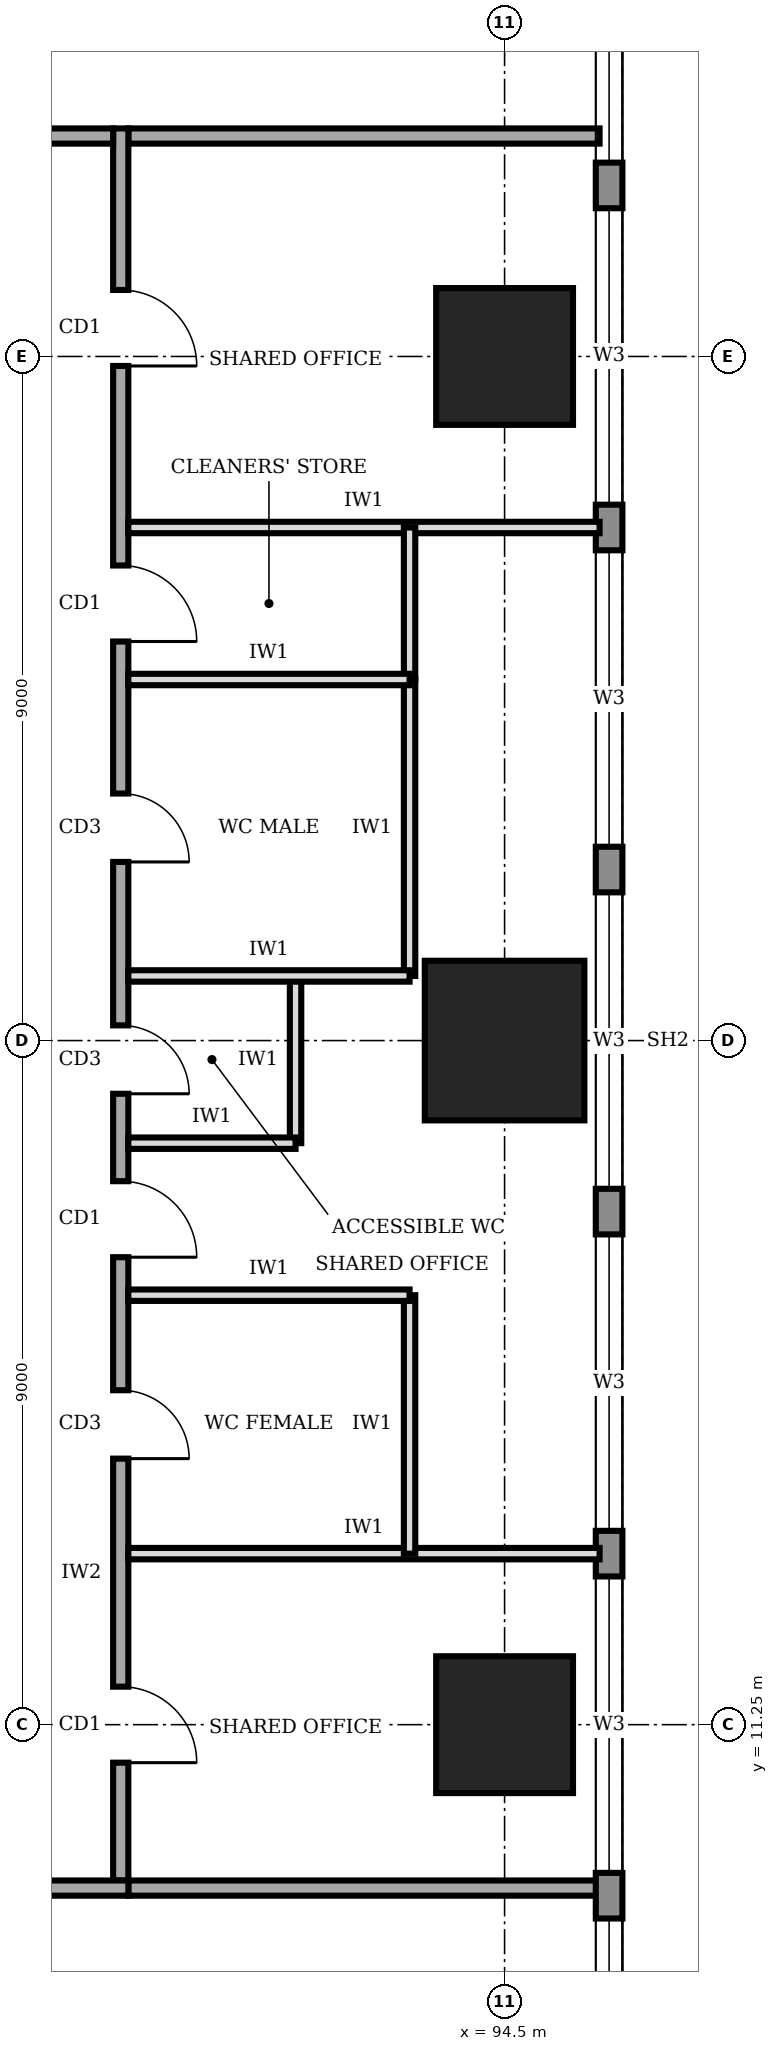
"""IFC4 building model, lengths in metres.
Left out: names, types, materials, properties, quantities, classifications, styles, units other than length and angle.
Written with IfcOpenShell. Run it as: python <this file> out.ifc"""

import sys

from ifc_helpers import new_model, si_unit, direction, frame, frame_2d, origin, origin_2d, place, context, subcontext, project, spatial, rectangle, extrude, element, fill, save


model = new_model("IFC4")
c1 = context("Model", 3, precision=1e-05, world=origin(), true_north=direction((0.0, 1.0)))
c2 = subcontext(c1, "Body", "Model", "MODEL_VIEW")
j1 = project(units=[si_unit("LENGTHUNIT", "METRE"), si_unit("PLANEANGLEUNIT", "RADIAN")], contexts=[c1])
p1 = place(None, origin())
s1 = spatial("IfcSite", under=j1, at=p1, CompositionType="ELEMENT")
p2 = place(p1, origin())
s2 = spatial("IfcBuilding", under=s1, at=p2, CompositionType="ELEMENT")
p3 = place(p2, frame((0.0, 0.0, 177.0)))
s3 = spatial("IfcBuildingStorey", under=s2, at=p3, CompositionType="ELEMENT", Elevation=177.0)
p4 = place(p3, frame((94.5, 11.25, 0.0), z_axis=(0.0, 0.0, 1.0), x_axis=(1.0, 0.0, 0.0)))
e1 = element("IfcColumn", 1, at=p4, inside=s3, PredefinedType="COLUMN", context=c2, shape_type="SweptSolid", body=[
    extrude(rectangle(XDim=1.8, YDim=1.8, at=origin_2d()), origin(), (0.0, 0.0, 1.0), 4.0),
])
p5 = place(p3, frame((94.5, 20.25, 0.0), z_axis=(0.0, 0.0, 1.0), x_axis=(1.0, 0.0, 0.0)))
e2 = element("IfcColumn", 2, at=p5, inside=s3, PredefinedType="COLUMN", context=c2, shape_type="SweptSolid", body=[
    extrude(rectangle(XDim=2.1, YDim=2.1, at=origin_2d()), origin(), (0.0, 0.0, 1.0), 4.0),
])
p6 = place(p3, frame((94.5, 29.25, 0.0), z_axis=(0.0, 0.0, 1.0), x_axis=(1.0, 0.0, 0.0)))
e3 = element("IfcColumn", 3, at=p6, inside=s3, PredefinedType="COLUMN", context=c2, shape_type="SweptSolid", body=[
    extrude(rectangle(XDim=1.8, YDim=1.8, at=origin_2d()), origin(), (0.0, 0.0, 1.0), 4.0),
])
p7 = place(p3, frame((95.875, 3.32, 0.0), z_axis=(0.0, 0.0, 1.0), x_axis=(0.0, 1.0, 0.0)))
e4 = element("IfcWall", 4, at=p7, inside=s3, PredefinedType="STANDARD", context=c2, shape_type="SweptSolid", body=[
    extrude(rectangle(XDim=33.86, YDim=0.35, at=frame_2d((16.93, 0.0))), origin(), (0.0, 0.0, 1.0), 3.75),
])
p8 = place(p7, frame((1.48, 0.0, 0.95)))
e5 = element("IfcOpeningElement", 5, at=p8, cuts=e4, PredefinedType="OPENING", context=c2, shape_type="SweptSolid", body=[
    extrude(rectangle(XDim=3.9, YDim=1.8, at=frame_2d((1.95, 0.9))), frame((0.0, 0.185, 0.0), z_axis=(0.0, -1.0, 0.0), x_axis=(1.0, 0.0, 0.0)), (0.0, 0.0, 1.0), 0.37),
])
p9 = place(p7, frame((5.98, 0.0, 0.95)))
e6 = element("IfcOpeningElement", 6, at=p9, cuts=e4, PredefinedType="OPENING", context=c2, shape_type="SweptSolid", body=[
    extrude(rectangle(XDim=3.9, YDim=1.8, at=frame_2d((1.95, 0.9))), frame((0.0, 0.185, 0.0), z_axis=(0.0, -1.0, 0.0), x_axis=(1.0, 0.0, 0.0)), (0.0, 0.0, 1.0), 0.37),
])
p10 = place(p7, frame((10.48, 0.0, 0.95)))
e7 = element("IfcOpeningElement", 7, at=p10, cuts=e4, PredefinedType="OPENING", context=c2, shape_type="SweptSolid", body=[
    extrude(rectangle(XDim=3.9, YDim=1.8, at=frame_2d((1.95, 0.9))), frame((0.0, 0.185, 0.0), z_axis=(0.0, -1.0, 0.0), x_axis=(1.0, 0.0, 0.0)), (0.0, 0.0, 1.0), 0.37),
])
p11 = place(p7, frame((14.98, 0.0, 0.95)))
e8 = element("IfcOpeningElement", 8, at=p11, cuts=e4, PredefinedType="OPENING", context=c2, shape_type="SweptSolid", body=[
    extrude(rectangle(XDim=3.9, YDim=1.8, at=frame_2d((1.95, 0.9))), frame((0.0, 0.185, 0.0), z_axis=(0.0, -1.0, 0.0), x_axis=(1.0, 0.0, 0.0)), (0.0, 0.0, 1.0), 0.37),
])
p12 = place(p7, frame((19.48, 0.0, 0.95)))
e9 = element("IfcOpeningElement", 9, at=p12, cuts=e4, PredefinedType="OPENING", context=c2, shape_type="SweptSolid", body=[
    extrude(rectangle(XDim=3.9, YDim=1.8, at=frame_2d((1.95, 0.9))), frame((0.0, 0.185, 0.0), z_axis=(0.0, -1.0, 0.0), x_axis=(1.0, 0.0, 0.0)), (0.0, 0.0, 1.0), 0.37),
])
p13 = place(p7, frame((23.98, 0.0, 0.95)))
e10 = element("IfcOpeningElement", 10, at=p13, cuts=e4, PredefinedType="OPENING", context=c2, shape_type="SweptSolid", body=[
    extrude(rectangle(XDim=3.9, YDim=1.8, at=frame_2d((1.95, 0.9))), frame((0.0, 0.185, 0.0), z_axis=(0.0, -1.0, 0.0), x_axis=(1.0, 0.0, 0.0)), (0.0, 0.0, 1.0), 0.37),
])
p14 = place(p7, frame((28.48, 0.0, 0.95)))
e11 = element("IfcOpeningElement", 11, at=p14, cuts=e4, PredefinedType="OPENING", context=c2, shape_type="SweptSolid", body=[
    extrude(rectangle(XDim=3.9, YDim=1.8, at=frame_2d((1.95, 0.9))), frame((0.0, 0.185, 0.0), z_axis=(0.0, -1.0, 0.0), x_axis=(1.0, 0.0, 0.0)), (0.0, 0.0, 1.0), 0.37),
])
p15 = place(p3, frame((72.65, 9.1, 0.0), z_axis=(0.0, 0.0, 1.0), x_axis=(1.0, 0.0, 0.0)))
e12 = element("IfcWall", 12, at=p15, inside=s3, PredefinedType="SOLIDWALL", context=c2, shape_type="SweptSolid", body=[
    extrude(rectangle(XDim=16.9, YDim=0.2, at=frame_2d((8.45, 0.0))), origin(), (0.0, 0.0, 1.0), 3.75),
])
p16 = place(p15, frame((1.325, 0.0, 0.0)))
e13 = element("IfcOpeningElement", 13, at=p16, cuts=e12, PredefinedType="OPENING", context=c2, shape_type="SweptSolid", body=[
    extrude(rectangle(XDim=1.0, YDim=2.1, at=frame_2d((0.5, 1.05))), frame((0.0, 0.11, 0.0), z_axis=(0.0, -1.0, 0.0), x_axis=(1.0, 0.0, 0.0)), (0.0, 0.0, 1.0), 0.22),
])
p17 = place(p15, frame((9.475, 0.0, 0.0)))
e14 = element("IfcOpeningElement", 14, at=p17, cuts=e12, PredefinedType="OPENING", context=c2, shape_type="SweptSolid", body=[
    extrude(rectangle(XDim=1.8, YDim=2.1, at=frame_2d((0.9, 1.05))), frame((0.0, 0.11, 0.0), z_axis=(0.0, -1.0, 0.0), x_axis=(1.0, 0.0, 0.0)), (0.0, 0.0, 1.0), 0.22),
])
p18 = place(p3, frame((89.45, 9.2, 0.0), z_axis=(0.0, 0.0, 1.0), x_axis=(0.0, 1.0, 0.0)))
e15 = element("IfcWall", 15, at=p18, inside=s3, PredefinedType="SOLIDWALL", context=c2, shape_type="SweptSolid", body=[
    extrude(rectangle(XDim=23.05, YDim=0.2, at=frame_2d((11.525, 0.0))), origin(), (0.0, 0.0, 1.0), 3.75),
])
p19 = place(p18, frame((1.55, 0.0, 0.0)))
e16 = element("IfcOpeningElement", 16, at=p19, cuts=e15, PredefinedType="OPENING", context=c2, shape_type="SweptSolid", body=[
    extrude(rectangle(XDim=1.0, YDim=2.1, at=frame_2d((0.5, 1.05))), frame((0.0, 0.11, 0.0), z_axis=(0.0, -1.0, 0.0), x_axis=(1.0, 0.0, 0.0)), (0.0, 0.0, 1.0), 0.22),
])
p20 = place(p18, frame((5.55, 0.0, 0.0)))
e17 = element("IfcOpeningElement", 17, at=p20, cuts=e15, PredefinedType="OPENING", context=c2, shape_type="SweptSolid", body=[
    extrude(rectangle(XDim=0.9, YDim=2.1, at=frame_2d((0.45, 1.05))), frame((0.0, 0.11, 0.0), z_axis=(0.0, -1.0, 0.0), x_axis=(1.0, 0.0, 0.0)), (0.0, 0.0, 1.0), 0.22),
])
p21 = place(p18, frame((10.35, 0.0, 0.0)))
e18 = element("IfcOpeningElement", 18, at=p21, cuts=e15, PredefinedType="OPENING", context=c2, shape_type="SweptSolid", body=[
    extrude(rectangle(XDim=0.9, YDim=2.1, at=frame_2d((0.45, 1.05))), frame((0.0, 0.11, 0.0), z_axis=(0.0, -1.0, 0.0), x_axis=(1.0, 0.0, 0.0)), (0.0, 0.0, 1.0), 0.22),
])
p22 = place(p18, frame((13.4, 0.0, 0.0)))
e19 = element("IfcOpeningElement", 19, at=p22, cuts=e15, PredefinedType="OPENING", context=c2, shape_type="SweptSolid", body=[
    extrude(rectangle(XDim=0.9, YDim=2.1, at=frame_2d((0.45, 1.05))), frame((0.0, 0.11, 0.0), z_axis=(0.0, -1.0, 0.0), x_axis=(1.0, 0.0, 0.0)), (0.0, 0.0, 1.0), 0.22),
])
p23 = place(p18, frame((16.3, 0.0, 0.0)))
e20 = element("IfcOpeningElement", 20, at=p23, cuts=e15, PredefinedType="OPENING", context=c2, shape_type="SweptSolid", body=[
    extrude(rectangle(XDim=1.0, YDim=2.1, at=frame_2d((0.5, 1.05))), frame((0.0, 0.11, 0.0), z_axis=(0.0, -1.0, 0.0), x_axis=(1.0, 0.0, 0.0)), (0.0, 0.0, 1.0), 0.22),
])
p24 = place(p18, frame((8.2, 0.0, 0.0)))
e21 = element("IfcOpeningElement", 21, at=p24, cuts=e15, PredefinedType="OPENING", context=c2, shape_type="SweptSolid", body=[
    extrude(rectangle(XDim=1.0, YDim=2.1, at=frame_2d((0.5, 1.05))), frame((0.0, 0.11, 0.0), z_axis=(0.0, -1.0, 0.0), x_axis=(1.0, 0.0, 0.0)), (0.0, 0.0, 1.0), 0.22),
])
p25 = place(p18, frame((19.925, 0.0, 0.0)))
e22 = element("IfcOpeningElement", 22, at=p25, cuts=e15, PredefinedType="OPENING", context=c2, shape_type="SweptSolid", body=[
    extrude(rectangle(XDim=1.0, YDim=2.1, at=frame_2d((0.5, 1.05))), frame((0.0, 0.11, 0.0), z_axis=(0.0, -1.0, 0.0), x_axis=(1.0, 0.0, 0.0)), (0.0, 0.0, 1.0), 0.22),
])
p26 = place(p3, frame((89.35, 32.15, 0.0), z_axis=(0.0, 0.0, 1.0), x_axis=(-1.0, 0.0, 0.0)))
e23 = element("IfcWall", 23, at=p26, inside=s3, PredefinedType="SOLIDWALL", context=c2, shape_type="SweptSolid", body=[
    extrude(rectangle(XDim=16.9, YDim=0.2, at=frame_2d((8.45, 0.0))), origin(), (0.0, 0.0, 1.0), 3.75),
])
p27 = place(p26, frame((3.575, 0.0, 0.0)))
e24 = element("IfcOpeningElement", 24, at=p27, cuts=e23, PredefinedType="OPENING", context=c2, shape_type="SweptSolid", body=[
    extrude(rectangle(XDim=1.0, YDim=2.1, at=frame_2d((0.5, 1.05))), frame((0.0, 0.11, 0.0), z_axis=(0.0, -1.0, 0.0), x_axis=(1.0, 0.0, 0.0)), (0.0, 0.0, 1.0), 0.22),
])
for number, where, z_axis, x_axis in (
    (25, (89.55, 9.1, 0.0), (0.0, 0.0, 1.0), (1.0, 0.0, 0.0)),
    (26, (89.55, 32.15, 0.0), (0.0, 0.0, 1.0), (1.0, 0.0, 0.0)),
):
    element("IfcWall", number, at=place(p3, frame(where, z_axis=z_axis, x_axis=x_axis)), inside=s3, PredefinedType="SOLIDWALL", context=c2, shape_type="SweptSolid", body=[
        extrude(rectangle(XDim=6.2, YDim=0.2, at=frame_2d((3.1, 0.0))), origin(), (0.0, 0.0, 1.0), 3.75),
    ])
for number, where, z_axis, x_axis in (
    (27, (89.55, 13.5, 0.0), (0.0, 0.0, 1.0), (1.0, 0.0, 0.0)),
    (28, (89.55, 27.0, 0.0), (0.0, 0.0, 1.0), (1.0, 0.0, 0.0)),
):
    element("IfcWall", number, at=place(p3, frame(where, z_axis=z_axis, x_axis=x_axis)), inside=s3, PredefinedType="PARTITIONING", context=c2, shape_type="SweptSolid", body=[
        extrude(rectangle(XDim=6.2, YDim=0.15, at=frame_2d((3.1, 0.0))), origin(), (0.0, 0.0, 1.0), 3.75),
    ])
p28 = place(p3, frame((89.55, 16.9, 0.0), z_axis=(0.0, 0.0, 1.0), x_axis=(1.0, 0.0, 0.0)))
e29 = element("IfcWall", 29, at=p28, inside=s3, PredefinedType="PARTITIONING", context=c2, shape_type="SweptSolid", body=[
    extrude(rectangle(XDim=3.7, YDim=0.15, at=frame_2d((1.85, 0.0))), origin(), (0.0, 0.0, 1.0), 3.75),
])
p29 = place(p3, frame((89.55, 18.9, 0.0), z_axis=(0.0, 0.0, 1.0), x_axis=(1.0, 0.0, 0.0)))
e30 = element("IfcWall", 30, at=p29, inside=s3, PredefinedType="PARTITIONING", context=c2, shape_type="SweptSolid", body=[
    extrude(rectangle(XDim=2.2, YDim=0.15, at=frame_2d((1.1, 0.0))), origin(), (0.0, 0.0, 1.0), 3.75),
])
p30 = place(p3, frame((89.55, 21.1, 0.0), z_axis=(0.0, 0.0, 1.0), x_axis=(1.0, 0.0, 0.0)))
e31 = element("IfcWall", 31, at=p30, inside=s3, PredefinedType="PARTITIONING", context=c2, shape_type="SweptSolid", body=[
    extrude(rectangle(XDim=3.7, YDim=0.15, at=frame_2d((1.85, 0.0))), origin(), (0.0, 0.0, 1.0), 2.85),
])
p31 = place(p3, frame((89.55, 25.0, 0.0), z_axis=(0.0, 0.0, 1.0), x_axis=(1.0, 0.0, 0.0)))
e32 = element("IfcWall", 32, at=p31, inside=s3, PredefinedType="PARTITIONING", context=c2, shape_type="SweptSolid", body=[
    extrude(rectangle(XDim=3.7, YDim=0.15, at=frame_2d((1.85, 0.0))), origin(), (0.0, 0.0, 1.0), 3.75),
])
p32 = place(p3, frame((93.25, 13.5, 0.0), z_axis=(0.0, 0.0, 1.0), x_axis=(0.0, 1.0, 0.0)))
e33 = element("IfcWall", 33, at=p32, inside=s3, PredefinedType="PARTITIONING", context=c2, shape_type="SweptSolid", body=[
    extrude(rectangle(XDim=3.4, YDim=0.15, at=frame_2d((1.7, 0.0))), origin(), (0.0, 0.0, 1.0), 3.75),
])
p33 = place(p3, frame((91.75, 18.9, 0.0), z_axis=(0.0, 0.0, 1.0), x_axis=(0.0, 1.0, 0.0)))
e34 = element("IfcWall", 34, at=p33, inside=s3, PredefinedType="PARTITIONING", context=c2, shape_type="SweptSolid", body=[
    extrude(rectangle(XDim=2.2, YDim=0.15, at=frame_2d((1.1, 0.0))), origin(), (0.0, 0.0, 1.0), 3.75),
])
p34 = place(p3, frame((93.25, 21.1, 0.0), z_axis=(0.0, 0.0, 1.0), x_axis=(0.0, 1.0, 0.0)))
e35 = element("IfcWall", 35, at=p34, inside=s3, PredefinedType="PARTITIONING", context=c2, shape_type="SweptSolid", body=[
    extrude(rectangle(XDim=3.9, YDim=0.15, at=frame_2d((1.95, 0.0))), origin(), (0.0, 0.0, 1.0), 3.75),
])
p35 = place(p3, frame((93.25, 25.0, 0.0), z_axis=(0.0, 0.0, 1.0), x_axis=(0.0, 1.0, 0.0)))
e36 = element("IfcWall", 36, at=p35, inside=s3, PredefinedType="PARTITIONING", context=c2, shape_type="SweptSolid", body=[
    extrude(rectangle(XDim=2.0, YDim=0.15, at=frame_2d((1.0, 0.0))), origin(), (0.0, 0.0, 1.0), 3.75),
])
p36 = place(p8, origin())
e37 = element("IfcWindow", 37, at=p36, inside=s3, PartitioningType="SINGLE_PANEL", PredefinedType="WINDOW", context=c2, shape_type="SweptSolid", body=[
    extrude(rectangle(XDim=3.9, YDim=1.8, at=frame_2d((1.95, 0.9))), frame((0.0, 0.03, 0.0), z_axis=(0.0, -1.0, 0.0), x_axis=(1.0, 0.0, 0.0)), (0.0, 0.0, 1.0), 0.06),
])
fill(e5, e37)
p37 = place(p9, origin())
e38 = element("IfcWindow", 38, at=p37, inside=s3, PartitioningType="SINGLE_PANEL", PredefinedType="WINDOW", context=c2, shape_type="SweptSolid", body=[
    extrude(rectangle(XDim=3.9, YDim=1.8, at=frame_2d((1.95, 0.9))), frame((0.0, 0.03, 0.0), z_axis=(0.0, -1.0, 0.0), x_axis=(1.0, 0.0, 0.0)), (0.0, 0.0, 1.0), 0.06),
])
fill(e6, e38)
p38 = place(p10, origin())
e39 = element("IfcWindow", 39, at=p38, inside=s3, PartitioningType="SINGLE_PANEL", PredefinedType="WINDOW", context=c2, shape_type="SweptSolid", body=[
    extrude(rectangle(XDim=3.9, YDim=1.8, at=frame_2d((1.95, 0.9))), frame((0.0, 0.03, 0.0), z_axis=(0.0, -1.0, 0.0), x_axis=(1.0, 0.0, 0.0)), (0.0, 0.0, 1.0), 0.06),
])
fill(e7, e39)
p39 = place(p11, origin())
e40 = element("IfcWindow", 40, at=p39, inside=s3, PartitioningType="SINGLE_PANEL", PredefinedType="WINDOW", context=c2, shape_type="SweptSolid", body=[
    extrude(rectangle(XDim=3.9, YDim=1.8, at=frame_2d((1.95, 0.9))), frame((0.0, 0.03, 0.0), z_axis=(0.0, -1.0, 0.0), x_axis=(1.0, 0.0, 0.0)), (0.0, 0.0, 1.0), 0.06),
])
fill(e8, e40)
p40 = place(p12, origin())
e41 = element("IfcWindow", 41, at=p40, inside=s3, PartitioningType="SINGLE_PANEL", PredefinedType="WINDOW", context=c2, shape_type="SweptSolid", body=[
    extrude(rectangle(XDim=3.9, YDim=1.8, at=frame_2d((1.95, 0.9))), frame((0.0, 0.03, 0.0), z_axis=(0.0, -1.0, 0.0), x_axis=(1.0, 0.0, 0.0)), (0.0, 0.0, 1.0), 0.06),
])
fill(e9, e41)
p41 = place(p13, origin())
e42 = element("IfcWindow", 42, at=p41, inside=s3, PartitioningType="SINGLE_PANEL", PredefinedType="WINDOW", context=c2, shape_type="SweptSolid", body=[
    extrude(rectangle(XDim=3.9, YDim=1.8, at=frame_2d((1.95, 0.9))), frame((0.0, 0.03, 0.0), z_axis=(0.0, -1.0, 0.0), x_axis=(1.0, 0.0, 0.0)), (0.0, 0.0, 1.0), 0.06),
])
fill(e10, e42)
p42 = place(p14, origin())
e43 = element("IfcWindow", 43, at=p42, inside=s3, PartitioningType="SINGLE_PANEL", PredefinedType="WINDOW", context=c2, shape_type="SweptSolid", body=[
    extrude(rectangle(XDim=3.9, YDim=1.8, at=frame_2d((1.95, 0.9))), frame((0.0, 0.03, 0.0), z_axis=(0.0, -1.0, 0.0), x_axis=(1.0, 0.0, 0.0)), (0.0, 0.0, 1.0), 0.06),
])
fill(e11, e43)
p43 = place(p19, frame((1.0, 0.0, 0.0), z_axis=(0.0, 0.0, 1.0), x_axis=(-1.0, 0.0, 0.0)))
e44 = element("IfcDoor", 44, at=p43, inside=s3, OperationType="SINGLE_SWING_RIGHT", PredefinedType="DOOR", context=c2, shape_type="SweptSolid", body=[
    extrude(rectangle(XDim=1.0, YDim=2.1, at=frame_2d((0.5, 1.05))), frame((0.0, 0.025, 0.0), z_axis=(0.0, -1.0, 0.0), x_axis=(1.0, 0.0, 0.0)), (0.0, 0.0, 1.0), 0.05),
])
fill(e16, e44)
p44 = place(p20, frame((0.9, 0.0, 0.0), z_axis=(0.0, 0.0, 1.0), x_axis=(-1.0, 0.0, 0.0)))
e45 = element("IfcDoor", 45, at=p44, inside=s3, OperationType="SINGLE_SWING_RIGHT", PredefinedType="DOOR", context=c2, shape_type="SweptSolid", body=[
    extrude(rectangle(XDim=0.9, YDim=2.1, at=frame_2d((0.45, 1.05))), frame((0.0, 0.025, 0.0), z_axis=(0.0, -1.0, 0.0), x_axis=(1.0, 0.0, 0.0)), (0.0, 0.0, 1.0), 0.05),
])
fill(e17, e45)
p45 = place(p21, frame((0.9, 0.0, 0.0), z_axis=(0.0, 0.0, 1.0), x_axis=(-1.0, 0.0, 0.0)))
e46 = element("IfcDoor", 46, at=p45, inside=s3, OperationType="SINGLE_SWING_RIGHT", PredefinedType="DOOR", context=c2, shape_type="SweptSolid", body=[
    extrude(rectangle(XDim=0.9, YDim=2.1, at=frame_2d((0.45, 1.05))), frame((0.0, 0.025, 0.0), z_axis=(0.0, -1.0, 0.0), x_axis=(1.0, 0.0, 0.0)), (0.0, 0.0, 1.0), 0.05),
])
fill(e18, e46)
p46 = place(p22, frame((0.9, 0.0, 0.0), z_axis=(0.0, 0.0, 1.0), x_axis=(-1.0, 0.0, 0.0)))
e47 = element("IfcDoor", 47, at=p46, inside=s3, OperationType="SINGLE_SWING_RIGHT", PredefinedType="DOOR", context=c2, shape_type="SweptSolid", body=[
    extrude(rectangle(XDim=0.9, YDim=2.1, at=frame_2d((0.45, 1.05))), frame((0.0, 0.025, 0.0), z_axis=(0.0, -1.0, 0.0), x_axis=(1.0, 0.0, 0.0)), (0.0, 0.0, 1.0), 0.05),
])
fill(e19, e47)
p47 = place(p23, frame((1.0, 0.0, 0.0), z_axis=(0.0, 0.0, 1.0), x_axis=(-1.0, 0.0, 0.0)))
e48 = element("IfcDoor", 48, at=p47, inside=s3, OperationType="SINGLE_SWING_RIGHT", PredefinedType="DOOR", context=c2, shape_type="SweptSolid", body=[
    extrude(rectangle(XDim=1.0, YDim=2.1, at=frame_2d((0.5, 1.05))), frame((0.0, 0.025, 0.0), z_axis=(0.0, -1.0, 0.0), x_axis=(1.0, 0.0, 0.0)), (0.0, 0.0, 1.0), 0.05),
])
fill(e20, e48)
p48 = place(p24, frame((1.0, 0.0, 0.0), z_axis=(0.0, 0.0, 1.0), x_axis=(-1.0, 0.0, 0.0)))
e49 = element("IfcDoor", 49, at=p48, inside=s3, OperationType="SINGLE_SWING_RIGHT", PredefinedType="DOOR", context=c2, shape_type="SweptSolid", body=[
    extrude(rectangle(XDim=1.0, YDim=2.1, at=frame_2d((0.5, 1.05))), frame((0.0, 0.025, 0.0), z_axis=(0.0, -1.0, 0.0), x_axis=(1.0, 0.0, 0.0)), (0.0, 0.0, 1.0), 0.05),
])
fill(e21, e49)
p49 = place(p25, frame((1.0, 0.0, 0.0), z_axis=(0.0, 0.0, 1.0), x_axis=(-1.0, 0.0, 0.0)))
e50 = element("IfcDoor", 50, at=p49, inside=s3, OperationType="SINGLE_SWING_RIGHT", PredefinedType="DOOR", context=c2, shape_type="SweptSolid", body=[
    extrude(rectangle(XDim=1.0, YDim=2.1, at=frame_2d((0.5, 1.05))), frame((0.0, 0.025, 0.0), z_axis=(0.0, -1.0, 0.0), x_axis=(1.0, 0.0, 0.0)), (0.0, 0.0, 1.0), 0.05),
])
fill(e22, e50)
save(model, sys.argv[1])
